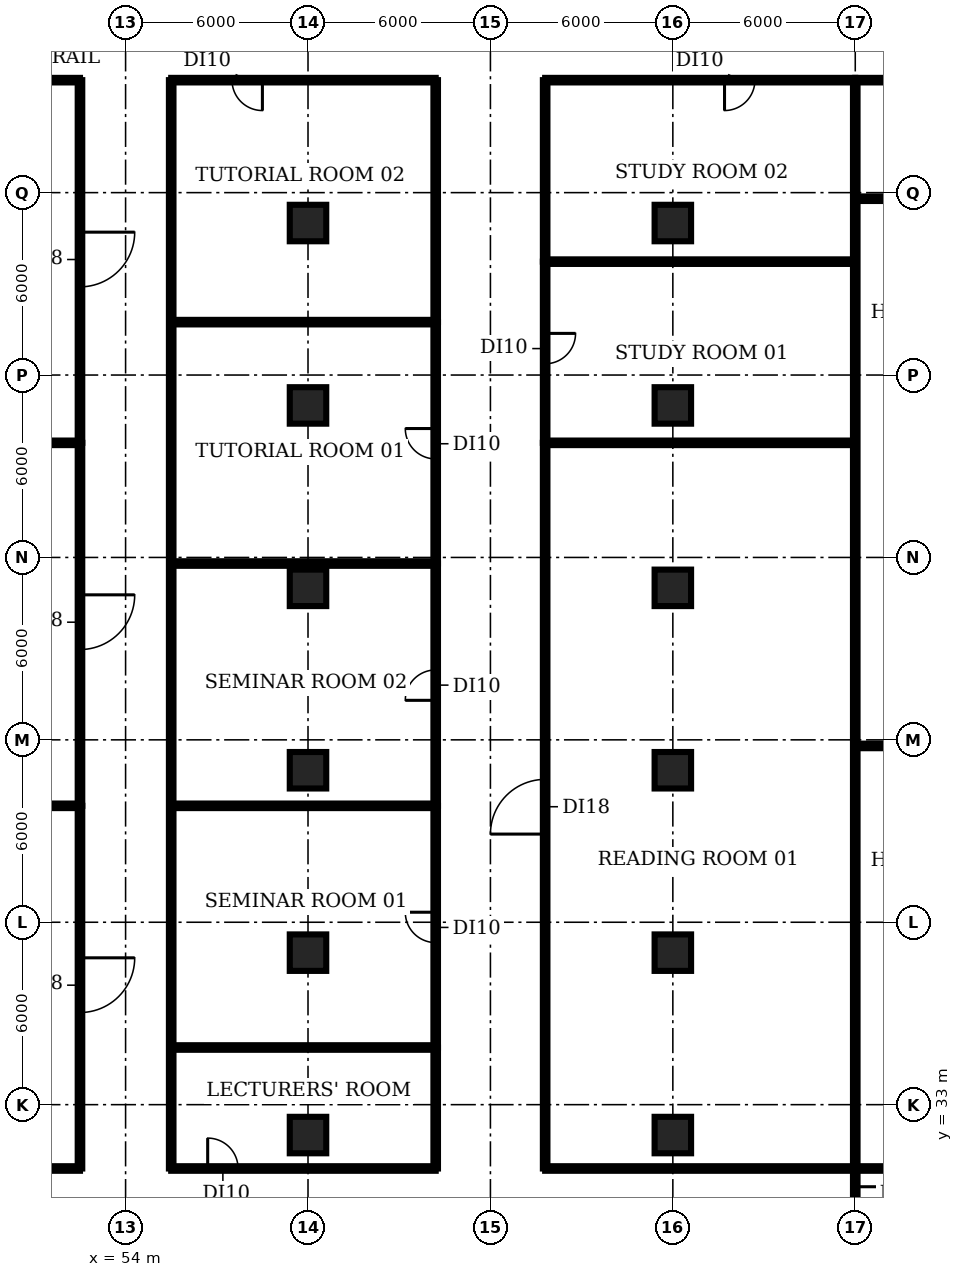
"""IFC4 building model, lengths in metres.
Left out: names, types, materials, properties, quantities, classifications, styles, units other than length and angle.
Written with IfcOpenShell. Run it as: python <this file> out.ifc"""

import sys

from ifc_helpers import new_model, si_unit, direction, frame, frame_2d, origin, origin_2d, place, context, subcontext, project, spatial, rectangle, extrude, element, fill, save


model = new_model("IFC4")
c1 = context("Model", 3, precision=1e-05, world=origin(), true_north=direction((0.0, 1.0)))
c2 = subcontext(c1, "Body", "Model", "MODEL_VIEW")
j1 = project(units=[si_unit("LENGTHUNIT", "METRE"), si_unit("PLANEANGLEUNIT", "RADIAN")], contexts=[c1])
p1 = place(None, origin())
s1 = spatial("IfcSite", under=j1, at=p1, CompositionType="ELEMENT")
p2 = place(p1, origin())
s2 = spatial("IfcBuilding", under=s1, at=p2, CompositionType="ELEMENT")
p3 = place(p2, origin())
s3 = spatial("IfcBuildingStorey", under=s2, at=p3, CompositionType="ELEMENT", Elevation=0.0)
for number, where, z_axis, x_axis in (
    (1, (60.0, 32.0, 0.0), (0.0, 0.0, 1.0), (1.0, 0.0, 0.0)),
    (2, (60.0, 38.0, 0.0), (0.0, 0.0, 1.0), (1.0, 0.0, 0.0)),
    (3, (60.0, 44.0, 0.0), (0.0, 0.0, 1.0), (1.0, 0.0, 0.0)),
    (4, (60.0, 50.0, 0.0), (0.0, 0.0, 1.0), (1.0, 0.0, 0.0)),
    (5, (60.0, 56.0, 0.0), (0.0, 0.0, 1.0), (1.0, 0.0, 0.0)),
    (6, (60.0, 62.0, 0.0), (0.0, 0.0, 1.0), (1.0, 0.0, 0.0)),
    (7, (72.0, 32.0, 0.0), (0.0, 0.0, 1.0), (1.0, 0.0, 0.0)),
    (8, (72.0, 38.0, 0.0), (0.0, 0.0, 1.0), (1.0, 0.0, 0.0)),
    (9, (72.0, 44.0, 0.0), (0.0, 0.0, 1.0), (1.0, 0.0, 0.0)),
    (10, (72.0, 50.0, 0.0), (0.0, 0.0, 1.0), (1.0, 0.0, 0.0)),
    (11, (72.0, 56.0, 0.0), (0.0, 0.0, 1.0), (1.0, 0.0, 0.0)),
    (12, (72.0, 62.0, 0.0), (0.0, 0.0, 1.0), (1.0, 0.0, 0.0)),
):
    element("IfcColumn", number, at=place(p3, frame(where, z_axis=z_axis, x_axis=x_axis)), inside=s3, PredefinedType="COLUMN", context=c2, shape_type="SweptSolid", body=[
        extrude(rectangle(XDim=1.2, YDim=1.2, at=origin_2d()), origin(), (0.0, 0.0, 1.0), 5.65),
    ])
for number, where, z_axis, x_axis in (
    (13, (31.5, 30.9, 0.0), (0.0, 0.0, 1.0), (1.0, 0.0, 0.0)),
    (14, (31.5, 42.83, 0.0), (0.0, 0.0, 1.0), (1.0, 0.0, 0.0)),
    (15, (31.5, 54.77, 0.0), (0.0, 0.0, 1.0), (1.0, 0.0, 0.0)),
):
    element("IfcWall", number, at=place(p3, frame(where, z_axis=z_axis, x_axis=x_axis)), inside=s3, PredefinedType="PARTITIONING", context=c2, shape_type="SweptSolid", body=[
        extrude(rectangle(XDim=21.0, YDim=0.15, at=frame_2d((10.5, 0.0))), origin(), (0.0, 0.0, 1.0), 4.53),
    ])
p4 = place(p3, frame((46.6, 66.7, 0.0), z_axis=(0.0, 0.0, 1.0), x_axis=(1.0, 0.0, 0.0)))
e16 = element("IfcWall", 16, at=p4, inside=s3, PredefinedType="PARTITIONING", context=c2, shape_type="SweptSolid", body=[
    extrude(rectangle(XDim=5.9, YDim=0.15, at=frame_2d((2.95, 0.0))), origin(), (0.0, 0.0, 1.0), 4.53),
])
p5 = place(p3, frame((52.5, 42.83, 0.0), z_axis=(0.0, 0.0, 1.0), x_axis=(0.0, -1.0, 0.0)))
e17 = element("IfcWall", 17, at=p5, inside=s3, PredefinedType="PARTITIONING", context=c2, shape_type="SweptSolid", body=[
    extrude(rectangle(XDim=11.93, YDim=0.15, at=frame_2d((5.965, 0.0))), origin(), (0.0, 0.0, 1.0), 4.53),
])
p6 = place(p5, frame((5.0, 0.0, 0.0)))
e18 = element("IfcOpeningElement", 18, at=p6, cuts=e17, PredefinedType="OPENING", context=c2, shape_type="SweptSolid", body=[
    extrude(rectangle(XDim=1.8, YDim=2.1, at=frame_2d((0.9, 1.05))), frame((0.0, 0.085, 0.0), z_axis=(0.0, -1.0, 0.0), x_axis=(1.0, 0.0, 0.0)), (0.0, 0.0, 1.0), 0.17),
])
p7 = place(p3, frame((52.5, 54.77, 0.0), z_axis=(0.0, 0.0, 1.0), x_axis=(0.0, -1.0, 0.0)))
e19 = element("IfcWall", 19, at=p7, inside=s3, PredefinedType="PARTITIONING", context=c2, shape_type="SweptSolid", body=[
    extrude(rectangle(XDim=11.94, YDim=0.15, at=frame_2d((5.97, 0.0))), origin(), (0.0, 0.0, 1.0), 4.53),
])
p8 = place(p7, frame((5.0, 0.0, 0.0)))
e20 = element("IfcOpeningElement", 20, at=p8, cuts=e19, PredefinedType="OPENING", context=c2, shape_type="SweptSolid", body=[
    extrude(rectangle(XDim=1.8, YDim=2.1, at=frame_2d((0.9, 1.05))), frame((0.0, 0.085, 0.0), z_axis=(0.0, -1.0, 0.0), x_axis=(1.0, 0.0, 0.0)), (0.0, 0.0, 1.0), 0.17),
])
p9 = place(p3, frame((52.5, 66.7, 0.0), z_axis=(0.0, 0.0, 1.0), x_axis=(0.0, -1.0, 0.0)))
e21 = element("IfcWall", 21, at=p9, inside=s3, PredefinedType="PARTITIONING", context=c2, shape_type="SweptSolid", body=[
    extrude(rectangle(XDim=11.93, YDim=0.15, at=frame_2d((5.965, 0.0))), origin(), (0.0, 0.0, 1.0), 4.53),
])
p10 = place(p9, frame((5.0, 0.0, 0.0)))
e22 = element("IfcOpeningElement", 22, at=p10, cuts=e21, PredefinedType="OPENING", context=c2, shape_type="SweptSolid", body=[
    extrude(rectangle(XDim=1.8, YDim=2.1, at=frame_2d((0.9, 1.05))), frame((0.0, 0.085, 0.0), z_axis=(0.0, -1.0, 0.0), x_axis=(1.0, 0.0, 0.0)), (0.0, 0.0, 1.0), 0.17),
])
p11 = place(p3, frame((55.5, 30.9, 0.0), z_axis=(0.0, 0.0, 1.0), x_axis=(0.0, 1.0, 0.0)))
e23 = element("IfcWall", 23, at=p11, inside=s3, PredefinedType="PARTITIONING", context=c2, shape_type="SweptSolid", body=[
    extrude(rectangle(XDim=35.8, YDim=0.15, at=frame_2d((17.9, 0.0))), origin(), (0.0, 0.0, 1.0), 4.53),
])
p12 = place(p3, frame((55.5, 30.9, 0.0), z_axis=(0.0, 0.0, 1.0), x_axis=(1.0, 0.0, 0.0)))
e24 = element("IfcWall", 24, at=p12, inside=s3, PredefinedType="PARTITIONING", context=c2, shape_type="SweptSolid", body=[
    extrude(rectangle(XDim=8.7, YDim=0.15, at=frame_2d((4.35, 0.0))), origin(), (0.0, 0.0, 1.0), 4.53),
])
p13 = place(p12, frame((1.2, 0.0, 0.0)))
e25 = element("IfcOpeningElement", 25, at=p13, cuts=e24, PredefinedType="OPENING", context=c2, shape_type="SweptSolid", body=[
    extrude(rectangle(XDim=1.0, YDim=2.1, at=frame_2d((0.5, 1.05))), frame((0.0, 0.085, 0.0), z_axis=(0.0, -1.0, 0.0), x_axis=(1.0, 0.0, 0.0)), (0.0, 0.0, 1.0), 0.17),
])
for number, where, z_axis, x_axis in (
    (26, (55.5, 34.88, 0.0), (0.0, 0.0, 1.0), (1.0, 0.0, 0.0)),
    (27, (55.5, 42.83, 0.0), (0.0, 0.0, 1.0), (1.0, 0.0, 0.0)),
    (28, (55.5, 50.8, 0.0), (0.0, 0.0, 1.0), (1.0, 0.0, 0.0)),
    (29, (55.5, 58.74, 0.0), (0.0, 0.0, 1.0), (1.0, 0.0, 0.0)),
):
    element("IfcWall", number, at=place(p3, frame(where, z_axis=z_axis, x_axis=x_axis)), inside=s3, PredefinedType="PARTITIONING", context=c2, shape_type="SweptSolid", body=[
        extrude(rectangle(XDim=8.7, YDim=0.15, at=frame_2d((4.35, 0.0))), origin(), (0.0, 0.0, 1.0), 4.53),
    ])
p14 = place(p3, frame((64.2, 30.9, 0.0), z_axis=(0.0, 0.0, 1.0), x_axis=(0.0, 1.0, 0.0)))
e30 = element("IfcWall", 30, at=p14, inside=s3, PredefinedType="PARTITIONING", context=c2, shape_type="SweptSolid", body=[
    extrude(rectangle(XDim=3.98, YDim=0.15, at=frame_2d((1.99, 0.0))), origin(), (0.0, 0.0, 1.0), 4.53),
])
p15 = place(p3, frame((64.2, 34.88, 0.0), z_axis=(0.0, 0.0, 1.0), x_axis=(0.0, 1.0, 0.0)))
e31 = element("IfcWall", 31, at=p15, inside=s3, PredefinedType="PARTITIONING", context=c2, shape_type="SweptSolid", body=[
    extrude(rectangle(XDim=7.95, YDim=0.15, at=frame_2d((3.975, 0.0))), origin(), (0.0, 0.0, 1.0), 4.53),
])
p16 = place(p15, frame((3.45, 0.0, 0.0)))
e32 = element("IfcOpeningElement", 32, at=p16, cuts=e31, PredefinedType="OPENING", context=c2, shape_type="SweptSolid", body=[
    extrude(rectangle(XDim=1.0, YDim=2.1, at=frame_2d((0.5, 1.05))), frame((0.0, 0.085, 0.0), z_axis=(0.0, -1.0, 0.0), x_axis=(1.0, 0.0, 0.0)), (0.0, 0.0, 1.0), 0.17),
])
p17 = place(p3, frame((64.2, 42.83, 0.0), z_axis=(0.0, 0.0, 1.0), x_axis=(0.0, 1.0, 0.0)))
e33 = element("IfcWall", 33, at=p17, inside=s3, PredefinedType="PARTITIONING", context=c2, shape_type="SweptSolid", body=[
    extrude(rectangle(XDim=7.97, YDim=0.15, at=frame_2d((3.985, 0.0))), origin(), (0.0, 0.0, 1.0), 4.53),
])
p18 = place(p17, frame((3.47, 0.0, 0.0)))
e34 = element("IfcOpeningElement", 34, at=p18, cuts=e33, PredefinedType="OPENING", context=c2, shape_type="SweptSolid", body=[
    extrude(rectangle(XDim=1.0, YDim=2.1, at=frame_2d((0.5, 1.05))), frame((0.0, 0.085, 0.0), z_axis=(0.0, -1.0, 0.0), x_axis=(1.0, 0.0, 0.0)), (0.0, 0.0, 1.0), 0.17),
])
p19 = place(p3, frame((64.2, 50.8, 0.0), z_axis=(0.0, 0.0, 1.0), x_axis=(0.0, 1.0, 0.0)))
e35 = element("IfcWall", 35, at=p19, inside=s3, PredefinedType="PARTITIONING", context=c2, shape_type="SweptSolid", body=[
    extrude(rectangle(XDim=7.94, YDim=0.15, at=frame_2d((3.97, 0.0))), origin(), (0.0, 0.0, 1.0), 4.53),
])
p20 = place(p19, frame((3.44, 0.0, 0.0)))
e36 = element("IfcOpeningElement", 36, at=p20, cuts=e35, PredefinedType="OPENING", context=c2, shape_type="SweptSolid", body=[
    extrude(rectangle(XDim=1.0, YDim=2.1, at=frame_2d((0.5, 1.05))), frame((0.0, 0.085, 0.0), z_axis=(0.0, -1.0, 0.0), x_axis=(1.0, 0.0, 0.0)), (0.0, 0.0, 1.0), 0.17),
])
p21 = place(p3, frame((64.2, 58.74, 0.0), z_axis=(0.0, 0.0, 1.0), x_axis=(0.0, 1.0, 0.0)))
e37 = element("IfcWall", 37, at=p21, inside=s3, PredefinedType="PARTITIONING", context=c2, shape_type="SweptSolid", body=[
    extrude(rectangle(XDim=7.96, YDim=0.15, at=frame_2d((3.98, 0.0))), origin(), (0.0, 0.0, 1.0), 4.53),
])
p22 = place(p3, frame((64.2, 66.7, 0.0), z_axis=(0.0, 0.0, 1.0), x_axis=(-1.0, 0.0, 0.0)))
e38 = element("IfcWall", 38, at=p22, inside=s3, PredefinedType="PARTITIONING", context=c2, shape_type="SweptSolid", body=[
    extrude(rectangle(XDim=8.7, YDim=0.15, at=frame_2d((4.35, 0.0))), origin(), (0.0, 0.0, 1.0), 4.53),
])
p23 = place(p22, frame((5.7, 0.0, 0.0)))
e39 = element("IfcOpeningElement", 39, at=p23, cuts=e38, PredefinedType="OPENING", context=c2, shape_type="SweptSolid", body=[
    extrude(rectangle(XDim=1.0, YDim=2.1, at=frame_2d((0.5, 1.05))), frame((0.0, 0.085, 0.0), z_axis=(0.0, -1.0, 0.0), x_axis=(1.0, 0.0, 0.0)), (0.0, 0.0, 1.0), 0.17),
])
p24 = place(p3, frame((67.8, 30.9, 0.0), z_axis=(0.0, 0.0, 1.0), x_axis=(0.0, 1.0, 0.0)))
e40 = element("IfcWall", 40, at=p24, inside=s3, PredefinedType="PARTITIONING", context=c2, shape_type="SweptSolid", body=[
    extrude(rectangle(XDim=23.87, YDim=0.15, at=frame_2d((11.935, 0.0))), origin(), (0.0, 0.0, 1.0), 4.53),
])
p25 = place(p24, frame((11.0, 0.0, 0.0)))
e41 = element("IfcOpeningElement", 41, at=p25, cuts=e40, PredefinedType="OPENING", context=c2, shape_type="SweptSolid", body=[
    extrude(rectangle(XDim=1.8, YDim=2.1, at=frame_2d((0.9, 1.05))), frame((0.0, 0.085, 0.0), z_axis=(0.0, -1.0, 0.0), x_axis=(1.0, 0.0, 0.0)), (0.0, 0.0, 1.0), 0.17),
])
for number, where, z_axis, x_axis in (
    (42, (67.8, 30.9, 0.0), (0.0, 0.0, 1.0), (1.0, 0.0, 0.0)),
    (43, (67.8, 54.77, 0.0), (0.0, 0.0, 1.0), (1.0, 0.0, 0.0)),
):
    element("IfcWall", number, at=place(p3, frame(where, z_axis=z_axis, x_axis=x_axis)), inside=s3, PredefinedType="PARTITIONING", context=c2, shape_type="SweptSolid", body=[
        extrude(rectangle(XDim=10.2, YDim=0.15, at=frame_2d((5.1, 0.0))), origin(), (0.0, 0.0, 1.0), 4.53),
    ])
p26 = place(p3, frame((67.8, 60.73, 0.0), z_axis=(0.0, 0.0, 1.0), x_axis=(0.0, -1.0, 0.0)))
e44 = element("IfcWall", 44, at=p26, inside=s3, PredefinedType="PARTITIONING", context=c2, shape_type="SweptSolid", body=[
    extrude(rectangle(XDim=5.96, YDim=0.15, at=frame_2d((2.98, 0.0))), origin(), (0.0, 0.0, 1.0), 4.53),
])
p27 = place(p26, frame((2.36, 0.0, 0.0)))
e45 = element("IfcOpeningElement", 45, at=p27, cuts=e44, PredefinedType="OPENING", context=c2, shape_type="SweptSolid", body=[
    extrude(rectangle(XDim=1.0, YDim=2.1, at=frame_2d((0.5, 1.05))), frame((0.0, 0.085, 0.0), z_axis=(0.0, -1.0, 0.0), x_axis=(1.0, 0.0, 0.0)), (0.0, 0.0, 1.0), 0.17),
])
p28 = place(p3, frame((67.8, 60.73, 0.0), z_axis=(0.0, 0.0, 1.0), x_axis=(0.0, 1.0, 0.0)))
e46 = element("IfcWall", 46, at=p28, inside=s3, PredefinedType="PARTITIONING", context=c2, shape_type="SweptSolid", body=[
    extrude(rectangle(XDim=5.97, YDim=0.15, at=frame_2d((2.985, 0.0))), origin(), (0.0, 0.0, 1.0), 4.53),
])
p29 = place(p3, frame((67.8, 60.73, 0.0), z_axis=(0.0, 0.0, 1.0), x_axis=(1.0, 0.0, 0.0)))
e47 = element("IfcWall", 47, at=p29, inside=s3, PredefinedType="PARTITIONING", context=c2, shape_type="SweptSolid", body=[
    extrude(rectangle(XDim=10.2, YDim=0.15, at=frame_2d((5.1, 0.0))), origin(), (0.0, 0.0, 1.0), 4.53),
])
p30 = place(p3, frame((78.0, 30.9, 0.0), z_axis=(0.0, 0.0, 1.0), x_axis=(0.0, -1.0, 0.0)))
e48 = element("IfcWall", 48, at=p30, inside=s3, PredefinedType="PARTITIONING", context=c2, shape_type="SweptSolid", body=[
    extrude(rectangle(XDim=3.0, YDim=0.15, at=frame_2d((1.5, 0.0))), origin(), (0.0, 0.0, 1.0), 4.53),
])
p31 = place(p30, frame((0.6, 0.0, 0.0)))
e49 = element("IfcOpeningElement", 49, at=p31, cuts=e48, PredefinedType="OPENING", context=c2, shape_type="SweptSolid", body=[
    extrude(rectangle(XDim=1.8, YDim=2.1, at=frame_2d((0.9, 1.05))), frame((0.0, 0.085, 0.0), z_axis=(0.0, -1.0, 0.0), x_axis=(1.0, 0.0, 0.0)), (0.0, 0.0, 1.0), 0.17),
])
p32 = place(p3, frame((78.0, 30.9, 0.0), z_axis=(0.0, 0.0, 1.0), x_axis=(0.0, 1.0, 0.0)))
e50 = element("IfcWall", 50, at=p32, inside=s3, PredefinedType="PARTITIONING", context=c2, shape_type="SweptSolid", body=[
    extrude(rectangle(XDim=35.8, YDim=0.15, at=frame_2d((17.9, 0.0))), origin(), (0.0, 0.0, 1.0), 4.53),
])
p33 = place(p3, frame((78.0, 30.9, 0.0), z_axis=(0.0, 0.0, 1.0), x_axis=(1.0, 0.0, 0.0)))
e51 = element("IfcWall", 51, at=p33, inside=s3, PredefinedType="PARTITIONING", context=c2, shape_type="SweptSolid", body=[
    extrude(rectangle(XDim=15.7, YDim=0.15, at=frame_2d((7.85, 0.0))), origin(), (0.0, 0.0, 1.0), 4.53),
])
p34 = place(p33, frame((8.3, 0.0, 0.0)))
e52 = element("IfcOpeningElement", 52, at=p34, cuts=e51, PredefinedType="OPENING", context=c2, shape_type="SweptSolid", body=[
    extrude(rectangle(XDim=1.2, YDim=2.1, at=frame_2d((0.6, 1.05))), frame((0.0, 0.085, 0.0), z_axis=(0.0, -1.0, 0.0), x_axis=(1.0, 0.0, 0.0)), (0.0, 0.0, 1.0), 0.17),
])
p35 = place(p3, frame((78.0, 44.8, 0.0), z_axis=(0.0, 0.0, 1.0), x_axis=(1.0, 0.0, 0.0)))
e53 = element("IfcWall", 53, at=p35, inside=s3, PredefinedType="PARTITIONING", context=c2, shape_type="SweptSolid", body=[
    extrude(rectangle(XDim=15.7, YDim=0.15, at=frame_2d((7.85, 0.0))), origin(), (0.0, 0.0, 1.0), 4.53),
])
p36 = place(p3, frame((78.0, 62.8, 0.0), z_axis=(0.0, 0.0, 1.0), x_axis=(1.0, 0.0, 0.0)))
e54 = element("IfcWall", 54, at=p36, inside=s3, PredefinedType="PARTITIONING", context=c2, shape_type="SweptSolid", body=[
    extrude(rectangle(XDim=14.95, YDim=0.15, at=frame_2d((7.475, 0.0))), origin(), (0.0, 0.0, 1.0), 4.53),
])
p37 = place(p3, frame((78.0, 66.7, 0.0), z_axis=(0.0, 0.0, 1.0), x_axis=(-1.0, 0.0, 0.0)))
e55 = element("IfcWall", 55, at=p37, inside=s3, PredefinedType="PARTITIONING", context=c2, shape_type="SweptSolid", body=[
    extrude(rectangle(XDim=10.2, YDim=0.15, at=frame_2d((5.1, 0.0))), origin(), (0.0, 0.0, 1.0), 4.53),
])
p38 = place(p37, frame((3.3, 0.0, 0.0)))
e56 = element("IfcOpeningElement", 56, at=p38, cuts=e55, PredefinedType="OPENING", context=c2, shape_type="SweptSolid", body=[
    extrude(rectangle(XDim=1.0, YDim=2.1, at=frame_2d((0.5, 1.05))), frame((0.0, 0.085, 0.0), z_axis=(0.0, -1.0, 0.0), x_axis=(1.0, 0.0, 0.0)), (0.0, 0.0, 1.0), 0.17),
])
p39 = place(p3, frame((89.05, 66.7, 0.0), z_axis=(0.0, 0.0, 1.0), x_axis=(-1.0, 0.0, 0.0)))
e57 = element("IfcWall", 57, at=p39, inside=s3, PredefinedType="PARTITIONING", context=c2, shape_type="SweptSolid", body=[
    extrude(rectangle(XDim=11.05, YDim=0.15, at=frame_2d((5.525, 0.0))), origin(), (0.0, 0.0, 1.0), 4.53),
])
p40 = place(p39, frame((6.65, 0.0, 0.0)))
e58 = element("IfcOpeningElement", 58, at=p40, cuts=e57, PredefinedType="OPENING", context=c2, shape_type="SweptSolid", body=[
    extrude(rectangle(XDim=0.9, YDim=2.1, at=frame_2d((0.45, 1.05))), frame((0.0, 0.085, 0.0), z_axis=(0.0, -1.0, 0.0), x_axis=(1.0, 0.0, 0.0)), (0.0, 0.0, 1.0), 0.17),
])
p41 = place(p6, origin())
e59 = element("IfcDoor", 59, at=p41, inside=s3, OperationType="SINGLE_SWING_LEFT", PredefinedType="DOOR", context=c2, shape_type="SweptSolid", body=[
    extrude(rectangle(XDim=1.8, YDim=2.1, at=frame_2d((0.9, 1.05))), frame((0.0, 0.025, 0.0), z_axis=(0.0, -1.0, 0.0), x_axis=(1.0, 0.0, 0.0)), (0.0, 0.0, 1.0), 0.05),
])
fill(e18, e59)
p42 = place(p8, origin())
e60 = element("IfcDoor", 60, at=p42, inside=s3, OperationType="SINGLE_SWING_LEFT", PredefinedType="DOOR", context=c2, shape_type="SweptSolid", body=[
    extrude(rectangle(XDim=1.8, YDim=2.1, at=frame_2d((0.9, 1.05))), frame((0.0, 0.025, 0.0), z_axis=(0.0, -1.0, 0.0), x_axis=(1.0, 0.0, 0.0)), (0.0, 0.0, 1.0), 0.05),
])
fill(e20, e60)
p43 = place(p10, origin())
e61 = element("IfcDoor", 61, at=p43, inside=s3, OperationType="SINGLE_SWING_LEFT", PredefinedType="DOOR", context=c2, shape_type="SweptSolid", body=[
    extrude(rectangle(XDim=1.8, YDim=2.1, at=frame_2d((0.9, 1.05))), frame((0.0, 0.025, 0.0), z_axis=(0.0, -1.0, 0.0), x_axis=(1.0, 0.0, 0.0)), (0.0, 0.0, 1.0), 0.05),
])
fill(e22, e61)
p44 = place(p13, origin())
e62 = element("IfcDoor", 62, at=p44, inside=s3, OperationType="SINGLE_SWING_LEFT", PredefinedType="DOOR", context=c2, shape_type="SweptSolid", body=[
    extrude(rectangle(XDim=1.0, YDim=2.1, at=frame_2d((0.5, 1.05))), frame((0.0, 0.025, 0.0), z_axis=(0.0, -1.0, 0.0), x_axis=(1.0, 0.0, 0.0)), (0.0, 0.0, 1.0), 0.05),
])
fill(e25, e62)
p45 = place(p16, origin())
e63 = element("IfcDoor", 63, at=p45, inside=s3, OperationType="SINGLE_SWING_RIGHT", PredefinedType="DOOR", context=c2, shape_type="SweptSolid", body=[
    extrude(rectangle(XDim=1.0, YDim=2.1, at=frame_2d((0.5, 1.05))), frame((0.0, 0.025, 0.0), z_axis=(0.0, -1.0, 0.0), x_axis=(1.0, 0.0, 0.0)), (0.0, 0.0, 1.0), 0.05),
])
fill(e32, e63)
p46 = place(p18, origin())
e64 = element("IfcDoor", 64, at=p46, inside=s3, OperationType="SINGLE_SWING_LEFT", PredefinedType="DOOR", context=c2, shape_type="SweptSolid", body=[
    extrude(rectangle(XDim=1.0, YDim=2.1, at=frame_2d((0.5, 1.05))), frame((0.0, 0.025, 0.0), z_axis=(0.0, -1.0, 0.0), x_axis=(1.0, 0.0, 0.0)), (0.0, 0.0, 1.0), 0.05),
])
fill(e34, e64)
p47 = place(p20, origin())
e65 = element("IfcDoor", 65, at=p47, inside=s3, OperationType="SINGLE_SWING_RIGHT", PredefinedType="DOOR", context=c2, shape_type="SweptSolid", body=[
    extrude(rectangle(XDim=1.0, YDim=2.1, at=frame_2d((0.5, 1.05))), frame((0.0, 0.025, 0.0), z_axis=(0.0, -1.0, 0.0), x_axis=(1.0, 0.0, 0.0)), (0.0, 0.0, 1.0), 0.05),
])
fill(e36, e65)
p48 = place(p23, origin())
e66 = element("IfcDoor", 66, at=p48, inside=s3, OperationType="SINGLE_SWING_LEFT", PredefinedType="DOOR", context=c2, shape_type="SweptSolid", body=[
    extrude(rectangle(XDim=1.0, YDim=2.1, at=frame_2d((0.5, 1.05))), frame((0.0, 0.025, 0.0), z_axis=(0.0, -1.0, 0.0), x_axis=(1.0, 0.0, 0.0)), (0.0, 0.0, 1.0), 0.05),
])
fill(e39, e66)
p49 = place(p25, origin())
e67 = element("IfcDoor", 67, at=p49, inside=s3, OperationType="SINGLE_SWING_LEFT", PredefinedType="DOOR", context=c2, shape_type="SweptSolid", body=[
    extrude(rectangle(XDim=1.8, YDim=2.1, at=frame_2d((0.9, 1.05))), frame((0.0, 0.025, 0.0), z_axis=(0.0, -1.0, 0.0), x_axis=(1.0, 0.0, 0.0)), (0.0, 0.0, 1.0), 0.05),
])
fill(e41, e67)
p50 = place(p27, origin())
e68 = element("IfcDoor", 68, at=p50, inside=s3, OperationType="SINGLE_SWING_LEFT", PredefinedType="DOOR", context=c2, shape_type="SweptSolid", body=[
    extrude(rectangle(XDim=1.0, YDim=2.1, at=frame_2d((0.5, 1.05))), frame((0.0, 0.025, 0.0), z_axis=(0.0, -1.0, 0.0), x_axis=(1.0, 0.0, 0.0)), (0.0, 0.0, 1.0), 0.05),
])
fill(e45, e68)
p51 = place(p31, origin())
e69 = element("IfcDoor", 69, at=p51, inside=s3, OperationType="SINGLE_SWING_LEFT", PredefinedType="DOOR", context=c2, shape_type="SweptSolid", body=[
    extrude(rectangle(XDim=1.8, YDim=2.1, at=frame_2d((0.9, 1.05))), frame((0.0, 0.025, 0.0), z_axis=(0.0, -1.0, 0.0), x_axis=(1.0, 0.0, 0.0)), (0.0, 0.0, 1.0), 0.05),
])
fill(e49, e69)
p52 = place(p38, origin())
e70 = element("IfcDoor", 70, at=p52, inside=s3, OperationType="SINGLE_SWING_RIGHT", PredefinedType="DOOR", context=c2, shape_type="SweptSolid", body=[
    extrude(rectangle(XDim=1.0, YDim=2.1, at=frame_2d((0.5, 1.05))), frame((0.0, 0.025, 0.0), z_axis=(0.0, -1.0, 0.0), x_axis=(1.0, 0.0, 0.0)), (0.0, 0.0, 1.0), 0.05),
])
fill(e56, e70)
save(model, sys.argv[1])
